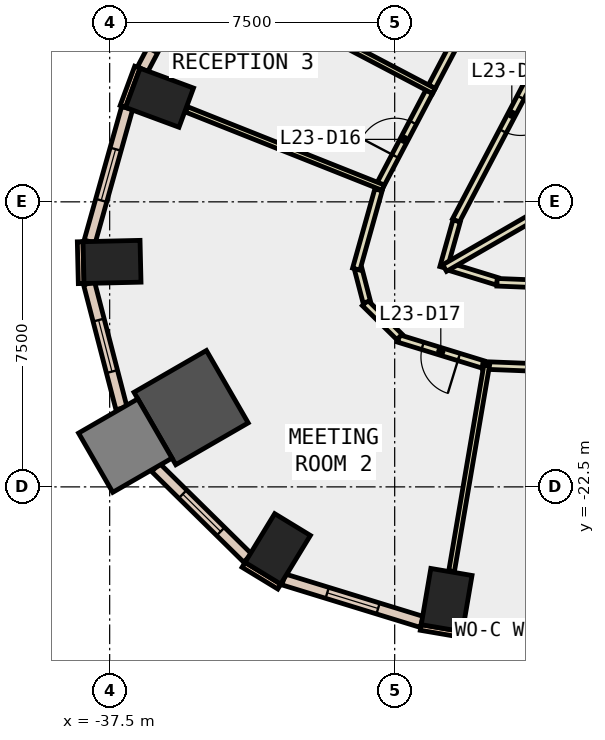
"""IFC4 building model, lengths in metres.
Left out: names, types, materials, properties, quantities, classifications, styles, units other than length and angle.
Written with IfcOpenShell. Run it as: python <this file> out.ifc"""

import sys

from ifc_helpers import new_model, si_unit, direction, frame, frame_2d, origin, origin_2d, place, context, subcontext, project, spatial, rectangle, extrude, element, fill, save


model = new_model("IFC4")
c1 = context("Model", 3, precision=1e-05, world=origin(), true_north=direction((0.0, 1.0)))
c2 = subcontext(c1, "Body", "Model", "MODEL_VIEW")
j1 = project(units=[si_unit("LENGTHUNIT", "METRE"), si_unit("PLANEANGLEUNIT", "RADIAN")], contexts=[c1])
p1 = place(None, origin())
s1 = spatial("IfcSite", under=j1, at=p1, CompositionType="ELEMENT")
p2 = place(p1, origin())
s2 = spatial("IfcBuilding", under=s1, at=p2, CompositionType="ELEMENT")
p3 = place(p2, frame((0.0, 0.0, 107.6)))
s3 = spatial("IfcBuildingStorey", under=s2, at=p3, CompositionType="ELEMENT", Elevation=107.6)
for number, where, z_axis, x_axis in (
    (1, (-28.633, -25.478, -0.4), (0.0, 0.0, 1.0), (-0.986, 0.168, 0.0)),
    (2, (-36.188, -12.261, -0.4), (0.0, 0.0, 1.0), (0.347, 0.938, 0.0)),
    (3, (-37.438, -16.581, -0.4), (0.0, 0.0, 1.0), (-0.023, 1.0, 0.0)),
):
    element("IfcColumn", number, at=place(p3, frame(where, z_axis=z_axis, x_axis=x_axis)), inside=s3, PredefinedType="COLUMN", context=c2, shape_type="SweptSolid", body=[
        extrude(rectangle(XDim=1.1, YDim=1.5, at=origin_2d()), origin(), (0.0, 0.0, 1.0), 4.2),
    ])
p4 = place(p3, frame((-35.357, -20.414, -0.4), z_axis=(0.0, 0.0, 1.0), x_axis=(0.866025403784, 0.5, 0.0)))
e4 = element("IfcColumn", 4, at=p4, inside=s3, PredefinedType="COLUMN", context=c2, shape_type="SweptSolid", body=[
    extrude(rectangle(XDim=2.2, YDim=2.2, at=origin_2d()), origin(), (0.0, 0.0, 1.0), 4.2),
])
p5 = place(p3, frame((-33.078, -24.132, -0.4), z_axis=(0.0, 0.0, 1.0), x_axis=(-0.854095929175, 0.520115510024, 0.0)))
e5 = element("IfcColumn", 5, at=p5, inside=s3, PredefinedType="COLUMN", context=c2, shape_type="SweptSolid", body=[
    extrude(rectangle(XDim=1.1, YDim=1.5, at=origin_2d()), origin(), (0.0, 0.0, 1.0), 4.2),
])
p6 = place(p3, frame((-37.089, -21.414, -0.4), z_axis=(0.0, 0.0, 1.0), x_axis=(0.866025403784, 0.5, 0.0)))
e6 = element("IfcColumn", 6, at=p6, inside=s3, PredefinedType="COLUMN", context=c2, shape_type="SweptSolid", body=[
    extrude(rectangle(XDim=1.8, YDim=1.8, at=origin_2d()), origin(), (0.0, 0.0, 1.0), 4.2),
])
p7 = place(p3, frame((-36.771, -11.458, 0.0), z_axis=(0.0, 0.0, 1.0), x_axis=(-0.347205967468, -0.937788897436, 0.0)))
e7 = element("IfcWall", 7, at=p7, inside=s3, PredefinedType="STANDARD", context=c2, shape_type="SweptSolid", body=[
    extrude(rectangle(XDim=1.1, YDim=0.15, at=frame_2d((0.55, 0.0))), origin(), (0.0, 0.0, 1.0), 3.8),
])
p8 = place(p3, frame((-29.314, -26.199, 0.0), z_axis=(0.0, 0.0, 1.0), x_axis=(0.985763338892, -0.168138751323, 0.0)))
e8 = element("IfcWall", 8, at=p8, inside=s3, PredefinedType="STANDARD", context=c2, shape_type="SweptSolid", body=[
    extrude(rectangle(XDim=1.101, YDim=0.15, at=frame_2d((0.55, 0.0))), origin(), (0.0, 0.0, 1.0), 3.8),
])
p9 = place(p3, frame((-38.276, -16.05, 0.0), z_axis=(0.0, 0.0, 1.0), x_axis=(0.023522901136, -0.999723298279, 0.0)))
e9 = element("IfcWall", 9, at=p9, inside=s3, PredefinedType="STANDARD", context=c2, shape_type="SweptSolid", body=[
    extrude(rectangle(XDim=1.1, YDim=0.15, at=frame_2d((0.55, 0.0))), origin(), (0.0, 0.0, 1.0), 3.8),
])
p10 = place(p3, frame((-33.977, -24.551, 0.0), z_axis=(0.0, 0.0, 1.0), x_axis=(0.854245682901, -0.519869515594, 0.0)))
e10 = element("IfcWall", 10, at=p10, inside=s3, PredefinedType="STANDARD", context=c2, shape_type="SweptSolid", body=[
    extrude(rectangle(XDim=1.1, YDim=0.15, at=frame_2d((0.55, 0.0))), origin(), (0.0, 0.0, 1.0), 3.8),
])
p11 = place(p3, frame((-28.205, -26.238, 0.0), z_axis=(0.0, 0.0, 1.0), x_axis=(0.99922113396, -0.039460428885, 0.0)))
e11 = element("IfcWall", 11, at=p11, inside=s3, PredefinedType="STANDARD", context=c2, shape_type="SweptSolid", body=[
    extrude(rectangle(XDim=5.878, YDim=0.3, at=frame_2d((2.939, 0.0))), origin(), (0.0, 0.0, 1.0), 3.8),
])
p12 = place(p11, frame((0.469, 0.0, 0.9)))
e12 = element("IfcOpeningElement", 12, at=p12, cuts=e11, PredefinedType="OPENING", context=c2, shape_type="SweptSolid", body=[
    extrude(rectangle(XDim=2.0, YDim=2.6, at=frame_2d((1.0, 1.3))), frame((0.0, 0.16, 0.0), z_axis=(0.0, -1.0, 0.0), x_axis=(1.0, 0.0, 0.0)), (0.0, 0.0, 1.0), 0.32),
])
p13 = place(p11, frame((3.408, 0.0, 0.9)))
e13 = element("IfcOpeningElement", 13, at=p13, cuts=e11, PredefinedType="OPENING", context=c2, shape_type="SweptSolid", body=[
    extrude(rectangle(XDim=2.0, YDim=2.6, at=frame_2d((1.0, 1.3))), frame((0.0, 0.16, 0.0), z_axis=(0.0, -1.0, 0.0), x_axis=(1.0, 0.0, 0.0)), (0.0, 0.0, 1.0), 0.32),
])
p14 = place(p3, frame((-33.776, -6.077, 0.0), z_axis=(0.0, 0.0, 1.0), x_axis=(-0.465380908665, -0.88511050714, 0.0)))
e14 = element("IfcWall", 14, at=p14, inside=s3, PredefinedType="STANDARD", context=c2, shape_type="SweptSolid", body=[
    extrude(rectangle(XDim=6.139, YDim=0.3, at=frame_2d((3.07, 0.0))), origin(), (0.0, 0.0, 1.0), 3.8),
])
p15 = place(p14, frame((0.535, 0.0, 0.9)))
e15 = element("IfcOpeningElement", 15, at=p15, cuts=e14, PredefinedType="OPENING", context=c2, shape_type="SweptSolid", body=[
    extrude(rectangle(XDim=2.0, YDim=2.6, at=frame_2d((1.0, 1.3))), frame((0.0, 0.16, 0.0), z_axis=(0.0, -1.0, 0.0), x_axis=(1.0, 0.0, 0.0)), (0.0, 0.0, 1.0), 0.32),
])
p16 = place(p14, frame((3.604, 0.0, 0.9)))
e16 = element("IfcOpeningElement", 16, at=p16, cuts=e14, PredefinedType="OPENING", context=c2, shape_type="SweptSolid", body=[
    extrude(rectangle(XDim=2.0, YDim=2.6, at=frame_2d((1.0, 1.3))), frame((0.0, 0.16, 0.0), z_axis=(0.0, -1.0, 0.0), x_axis=(1.0, 0.0, 0.0)), (0.0, 0.0, 1.0), 0.32),
])
p17 = place(p3, frame((-37.04, -12.531, 0.0), z_axis=(0.0, 0.0, 1.0), x_axis=(-0.270054089595, -0.96284515302, 0.0)))
e17 = element("IfcWall", 17, at=p17, inside=s3, PredefinedType="STANDARD", context=c2, shape_type="SweptSolid", body=[
    extrude(rectangle(XDim=3.651, YDim=0.3, at=frame_2d((1.825, 0.0))), origin(), (0.0, 0.0, 1.0), 3.8),
])
p18 = place(p17, frame((1.125, 0.0, 0.9)))
e18 = element("IfcOpeningElement", 18, at=p18, cuts=e17, PredefinedType="OPENING", context=c2, shape_type="SweptSolid", body=[
    extrude(rectangle(XDim=1.4, YDim=2.6, at=frame_2d((0.7, 1.3))), frame((0.0, 0.16, 0.0), z_axis=(0.0, -1.0, 0.0), x_axis=(1.0, 0.0, 0.0)), (0.0, 0.0, 1.0), 0.32),
])
p19 = place(p3, frame((-38.042, -17.144, 0.0), z_axis=(0.0, 0.0, 1.0), x_axis=(0.251046938153, -0.967974914367, 0.0)))
e19 = element("IfcWall", 19, at=p19, inside=s3, PredefinedType="STANDARD", context=c2, shape_type="SweptSolid", body=[
    extrude(rectangle(XDim=3.398, YDim=0.3, at=frame_2d((1.699, 0.0))), origin(), (0.0, 0.0, 1.0), 3.8),
])
p20 = place(p19, frame((0.999, 0.0, 0.9)))
e20 = element("IfcOpeningElement", 20, at=p20, cuts=e19, PredefinedType="OPENING", context=c2, shape_type="SweptSolid", body=[
    extrude(rectangle(XDim=1.4, YDim=2.6, at=frame_2d((0.7, 1.3))), frame((0.0, 0.16, 0.0), z_axis=(0.0, -1.0, 0.0), x_axis=(1.0, 0.0, 0.0)), (0.0, 0.0, 1.0), 0.32),
])
p21 = place(p3, frame((-36.289, -21.99, 0.0), z_axis=(0.0, 0.0, 1.0), x_axis=(0.712546371703, -0.701625019631, 0.0)))
e21 = element("IfcWall", 21, at=p21, inside=s3, PredefinedType="STANDARD", context=c2, shape_type="SweptSolid", body=[
    extrude(rectangle(XDim=3.398, YDim=0.3, at=frame_2d((1.699, 0.0))), origin(), (0.0, 0.0, 1.0), 3.8),
])
p22 = place(p21, frame((0.999, 0.0, 0.9)))
e22 = element("IfcOpeningElement", 22, at=p22, cuts=e21, PredefinedType="OPENING", context=c2, shape_type="SweptSolid", body=[
    extrude(rectangle(XDim=1.4, YDim=2.6, at=frame_2d((0.7, 1.3))), frame((0.0, 0.16, 0.0), z_axis=(0.0, -1.0, 0.0), x_axis=(1.0, 0.0, 0.0)), (0.0, 0.0, 1.0), 0.32),
])
p23 = place(p3, frame((-32.924, -24.935, 0.0), z_axis=(0.0, 0.0, 1.0), x_axis=(0.955841433148, -0.293882892794, 0.0)))
e23 = element("IfcWall", 23, at=p23, inside=s3, PredefinedType="STANDARD", context=c2, shape_type="SweptSolid", body=[
    extrude(rectangle(XDim=3.804, YDim=0.3, at=frame_2d((1.902, 0.0))), origin(), (0.0, 0.0, 1.0), 3.8),
])
p24 = place(p23, frame((1.202, 0.0, 0.9)))
e24 = element("IfcOpeningElement", 24, at=p24, cuts=e23, PredefinedType="OPENING", context=c2, shape_type="SweptSolid", body=[
    extrude(rectangle(XDim=1.4, YDim=2.6, at=frame_2d((0.7, 1.3))), frame((0.0, 0.16, 0.0), z_axis=(0.0, -1.0, 0.0), x_axis=(1.0, 0.0, 0.0)), (0.0, 0.0, 1.0), 0.32),
])
p25 = place(p3, frame((-25.446, -9.896, 0.0), z_axis=(0.0, 0.0, 1.0), x_axis=(-0.465367816287, -0.885117390838, 0.0)))
e25 = element("IfcWall", 25, at=p25, inside=s3, PredefinedType="PARTITIONING", context=c2, shape_type="SweptSolid", body=[
    extrude(rectangle(XDim=6.326, YDim=0.2, at=frame_2d((3.163, 0.0))), origin(), (0.0, 0.0, 1.0), 3.8),
])
p26 = place(p25, frame((2.663, 0.0, 0.0)))
e26 = element("IfcOpeningElement", 26, at=p26, cuts=e25, PredefinedType="OPENING", context=c2, shape_type="SweptSolid", body=[
    extrude(rectangle(XDim=1.0, YDim=2.1, at=frame_2d((0.5, 1.05))), frame((0.0, 0.11, 0.0), z_axis=(0.0, -1.0, 0.0), x_axis=(1.0, 0.0, 0.0)), (0.0, 0.0, 1.0), 0.22),
])
p27 = place(p3, frame((-28.37, -15.503, 0.0), z_axis=(0.0, 0.0, 1.0), x_axis=(-0.270645732093, -0.962679015924, 0.0)))
e27 = element("IfcWall", 27, at=p27, inside=s3, PredefinedType="PARTITIONING", context=c2, shape_type="SweptSolid", body=[
    extrude(rectangle(XDim=1.275, YDim=0.2, at=frame_2d((0.637, 0.0))), origin(), (0.0, 0.0, 1.0), 3.8),
])
p28 = place(p3, frame((-28.503, -16.722, 0.0), z_axis=(0.0, 0.0, 1.0), x_axis=(0.95579582576, -0.294031187904, 0.0)))
e28 = element("IfcWall", 28, at=p28, inside=s3, PredefinedType="PARTITIONING", context=c2, shape_type="SweptSolid", body=[
    extrude(rectangle(XDim=1.255, YDim=0.2, at=frame_2d((0.628, 0.0))), origin(), (0.0, 0.0, 1.0), 3.8),
])
p29 = place(p3, frame((-27.307, -17.116, 0.0), z_axis=(0.0, 0.0, 1.0), x_axis=(0.999217829656, -0.039544012168, 0.0)))
e29 = element("IfcWall", 29, at=p29, inside=s3, PredefinedType="PARTITIONING", context=c2, shape_type="SweptSolid", body=[
    extrude(rectangle(XDim=5.841, YDim=0.2, at=frame_2d((2.92, 0.0))), origin(), (0.0, 0.0, 1.0), 3.8),
])
p30 = place(p29, frame((2.42, 0.0, 0.0)))
e30 = element("IfcOpeningElement", 30, at=p30, cuts=e29, PredefinedType="OPENING", context=c2, shape_type="SweptSolid", body=[
    extrude(rectangle(XDim=1.0, YDim=2.1, at=frame_2d((0.5, 1.05))), frame((0.0, 0.11, 0.0), z_axis=(0.0, -1.0, 0.0), x_axis=(1.0, 0.0, 0.0)), (0.0, 0.0, 1.0), 0.22),
])
p31 = place(p3, frame((-29.023, -11.972, 0.0), z_axis=(0.0, 0.0, 1.0), x_axis=(0.465457263931, 0.885070356217, 0.0)))
e31 = element("IfcWall", 31, at=p31, inside=s3, PredefinedType="PARTITIONING", context=c2, shape_type="SweptSolid", body=[
    extrude(rectangle(XDim=3.515, YDim=0.2, at=frame_2d((1.757, 0.0))), origin(), (0.0, 0.0, 1.0), 3.8),
])
p32 = place(p31, frame((1.257, 0.0, 0.0)))
e32 = element("IfcOpeningElement", 32, at=p32, cuts=e31, PredefinedType="OPENING", context=c2, shape_type="SweptSolid", body=[
    extrude(rectangle(XDim=1.0, YDim=2.1, at=frame_2d((0.5, 1.05))), frame((0.0, 0.11, 0.0), z_axis=(0.0, -1.0, 0.0), x_axis=(1.0, 0.0, 0.0)), (0.0, 0.0, 1.0), 0.22),
])
p33 = place(p3, frame((-30.41, -14.61, 0.0), z_axis=(0.0, 0.0, 1.0), x_axis=(0.46516343569, 0.885224817827, 0.0)))
e33 = element("IfcWall", 33, at=p33, inside=s3, PredefinedType="PARTITIONING", context=c2, shape_type="SweptSolid", body=[
    extrude(rectangle(XDim=2.831, YDim=0.2, at=frame_2d((1.416, 0.0))), origin(), (0.0, 0.0, 1.0), 3.8),
])
p34 = place(p33, frame((0.916, 0.0, 0.0)))
e34 = element("IfcOpeningElement", 34, at=p34, cuts=e33, PredefinedType="OPENING", context=c2, shape_type="SweptSolid", body=[
    extrude(rectangle(XDim=1.0, YDim=2.1, at=frame_2d((0.5, 1.05))), frame((0.0, 0.11, 0.0), z_axis=(0.0, -1.0, 0.0), x_axis=(1.0, 0.0, 0.0)), (0.0, 0.0, 1.0), 0.22),
])
p35 = place(p3, frame((-27.676, -19.278, 0.0), z_axis=(0.0, 0.0, 1.0), x_axis=(-0.95581080774, 0.293982482143, 0.0)))
e35 = element("IfcWall", 35, at=p35, inside=s3, PredefinedType="PARTITIONING", context=c2, shape_type="SweptSolid", body=[
    extrude(rectangle(XDim=2.324, YDim=0.2, at=frame_2d((1.162, 0.0))), origin(), (0.0, 0.0, 1.0), 3.8),
])
p36 = place(p35, frame((0.662, 0.0, 0.0)))
e36 = element("IfcOpeningElement", 36, at=p36, cuts=e35, PredefinedType="OPENING", context=c2, shape_type="SweptSolid", body=[
    extrude(rectangle(XDim=1.0, YDim=2.1, at=frame_2d((0.5, 1.05))), frame((0.0, 0.11, 0.0), z_axis=(0.0, -1.0, 0.0), x_axis=(1.0, 0.0, 0.0)), (0.0, 0.0, 1.0), 0.22),
])
p37 = place(p3, frame((-29.873, -18.554, 0.0), z_axis=(0.0, 0.0, 1.0), x_axis=(-0.712546188185, 0.701625206006, 0.0)))
e37 = element("IfcWall", 37, at=p37, inside=s3, PredefinedType="PARTITIONING", context=c2, shape_type="SweptSolid", body=[
    extrude(rectangle(XDim=1.274, YDim=0.2, at=frame_2d((0.637, 0.0))), origin(), (0.0, 0.0, 1.0), 3.8),
])
p38 = place(p3, frame((-30.735, -17.634, 0.0), z_axis=(0.0, 0.0, 1.0), x_axis=(-0.251095196118, 0.967962397248, 0.0)))
e38 = element("IfcWall", 38, at=p38, inside=s3, PredefinedType="PARTITIONING", context=c2, shape_type="SweptSolid", body=[
    extrude(rectangle(XDim=0.892, YDim=0.2, at=frame_2d((0.446, 0.0))), origin(), (0.0, 0.0, 1.0), 3.8),
])
p39 = place(p3, frame((-31.011, -16.77, 0.0), z_axis=(0.0, 0.0, 1.0), x_axis=(0.270131711391, 0.962823378664, 0.0)))
e39 = element("IfcWall", 39, at=p39, inside=s3, PredefinedType="PARTITIONING", context=c2, shape_type="SweptSolid", body=[
    extrude(rectangle(XDim=2.166, YDim=0.2, at=frame_2d((1.083, 0.0))), origin(), (0.0, 0.0, 1.0), 3.8),
])
p40 = place(p3, frame((-21.547, -19.546, 0.0), z_axis=(0.0, 0.0, 1.0), x_axis=(-0.999216450883, 0.039578836331, 0.0)))
e40 = element("IfcWall", 40, at=p40, inside=s3, PredefinedType="PARTITIONING", context=c2, shape_type="SweptSolid", body=[
    extrude(rectangle(XDim=6.138, YDim=0.2, at=frame_2d((3.069, 0.0))), origin(), (0.0, 0.0, 1.0), 3.8),
])
p41 = place(p40, frame((2.569, 0.0, 0.0)))
e41 = element("IfcOpeningElement", 41, at=p41, cuts=e40, PredefinedType="OPENING", context=c2, shape_type="SweptSolid", body=[
    extrude(rectangle(XDim=1.0, YDim=2.1, at=frame_2d((0.5, 1.05))), frame((0.0, 0.11, 0.0), z_axis=(0.0, -1.0, 0.0), x_axis=(1.0, 0.0, 0.0)), (0.0, 0.0, 1.0), 0.22),
])
p42 = place(p3, frame((-19.277, -11.311, 0.0), z_axis=(0.0, 0.0, 1.0), x_axis=(-0.866078939042, -0.499907262747, 0.0)))
e42 = element("IfcWall", 42, at=p42, inside=s3, PredefinedType="PARTITIONING", context=c2, shape_type="SweptSolid", body=[
    extrude(rectangle(XDim=10.864, YDim=0.2, at=frame_2d((5.432, 0.0))), origin(), (0.0, 0.0, 1.0), 3.8),
])
p43 = place(p3, frame((-28.969, -12.084, 0.0), z_axis=(0.0, 0.0, 1.0), x_axis=(-0.885142220222, 0.465320588391, 0.0)))
e43 = element("IfcWall", 43, at=p43, inside=s3, PredefinedType="PARTITIONING", context=c2, shape_type="SweptSolid", body=[
    extrude(rectangle(XDim=6.9, YDim=0.15, at=frame_2d((3.45, 0.0))), origin(), (0.0, 0.0, 1.0), 3.8),
])
p44 = place(p3, frame((-30.306, -14.625, 0.0), z_axis=(0.0, 0.0, 1.0), x_axis=(-0.929128339298, 0.369757392235, 0.0)))
e44 = element("IfcWall", 44, at=p44, inside=s3, PredefinedType="PARTITIONING", context=c2, shape_type="SweptSolid", body=[
    extrude(rectangle(XDim=5.569, YDim=0.15, at=frame_2d((2.784, 0.0))), origin(), (0.0, 0.0, 1.0), 3.8),
])
p45 = place(p3, frame((-27.58, -19.307, 0.0), z_axis=(0.0, 0.0, 1.0), x_axis=(-0.168089900424, -0.98577167, 0.0)))
e45 = element("IfcWall", 45, at=p45, inside=s3, PredefinedType="PARTITIONING", context=c2, shape_type="SweptSolid", body=[
    extrude(rectangle(XDim=5.49, YDim=0.15, at=frame_2d((2.745, 0.0))), origin(), (0.0, 0.0, 1.0), 3.8),
])
p46 = place(p12, origin())
e46 = element("IfcWindow", 46, at=p46, inside=s3, PartitioningType="SINGLE_PANEL", PredefinedType="WINDOW", context=c2, shape_type="SweptSolid", body=[
    extrude(rectangle(XDim=2.0, YDim=2.6, at=frame_2d((1.0, 1.3))), frame((0.0, 0.03, 0.0), z_axis=(0.0, -1.0, 0.0), x_axis=(1.0, 0.0, 0.0)), (0.0, 0.0, 1.0), 0.06),
])
fill(e12, e46)
p47 = place(p18, origin())
e47 = element("IfcWindow", 47, at=p47, inside=s3, PartitioningType="SINGLE_PANEL", PredefinedType="WINDOW", context=c2, shape_type="SweptSolid", body=[
    extrude(rectangle(XDim=1.4, YDim=2.6, at=frame_2d((0.7, 1.3))), frame((0.0, 0.03, 0.0), z_axis=(0.0, -1.0, 0.0), x_axis=(1.0, 0.0, 0.0)), (0.0, 0.0, 1.0), 0.06),
])
fill(e18, e47)
p48 = place(p20, origin())
e48 = element("IfcWindow", 48, at=p48, inside=s3, PartitioningType="SINGLE_PANEL", PredefinedType="WINDOW", context=c2, shape_type="SweptSolid", body=[
    extrude(rectangle(XDim=1.4, YDim=2.6, at=frame_2d((0.7, 1.3))), frame((0.0, 0.03, 0.0), z_axis=(0.0, -1.0, 0.0), x_axis=(1.0, 0.0, 0.0)), (0.0, 0.0, 1.0), 0.06),
])
fill(e20, e48)
p49 = place(p22, origin())
e49 = element("IfcWindow", 49, at=p49, inside=s3, PartitioningType="SINGLE_PANEL", PredefinedType="WINDOW", context=c2, shape_type="SweptSolid", body=[
    extrude(rectangle(XDim=1.4, YDim=2.6, at=frame_2d((0.7, 1.3))), frame((0.0, 0.03, 0.0), z_axis=(0.0, -1.0, 0.0), x_axis=(1.0, 0.0, 0.0)), (0.0, 0.0, 1.0), 0.06),
])
fill(e22, e49)
p50 = place(p24, origin())
e50 = element("IfcWindow", 50, at=p50, inside=s3, PartitioningType="SINGLE_PANEL", PredefinedType="WINDOW", context=c2, shape_type="SweptSolid", body=[
    extrude(rectangle(XDim=1.4, YDim=2.6, at=frame_2d((0.7, 1.3))), frame((0.0, 0.03, 0.0), z_axis=(0.0, -1.0, 0.0), x_axis=(1.0, 0.0, 0.0)), (0.0, 0.0, 1.0), 0.06),
])
fill(e24, e50)
p51 = place(p34, origin())
e51 = element("IfcDoor", 51, at=p51, inside=s3, OperationType="SINGLE_SWING_LEFT", PredefinedType="DOOR", context=c2, shape_type="SweptSolid", body=[
    extrude(rectangle(XDim=1.0, YDim=2.1, at=frame_2d((0.5, 1.05))), frame((0.0, 0.025, 0.0), z_axis=(0.0, -1.0, 0.0), x_axis=(1.0, 0.0, 0.0)), (0.0, 0.0, 1.0), 0.05),
])
fill(e34, e51)
p52 = place(p36, origin())
e52 = element("IfcDoor", 52, at=p52, inside=s3, OperationType="SINGLE_SWING_LEFT", PredefinedType="DOOR", context=c2, shape_type="SweptSolid", body=[
    extrude(rectangle(XDim=1.0, YDim=2.1, at=frame_2d((0.5, 1.05))), frame((0.0, 0.025, 0.0), z_axis=(0.0, -1.0, 0.0), x_axis=(1.0, 0.0, 0.0)), (0.0, 0.0, 1.0), 0.05),
])
fill(e36, e52)
p53 = place(p26, origin())
e53 = element("IfcDoor", 53, at=p53, inside=s3, OperationType="SINGLE_SWING_LEFT", PredefinedType="DOOR", context=c2, shape_type="SweptSolid", body=[
    extrude(rectangle(XDim=1.0, YDim=2.1, at=frame_2d((0.5, 1.05))), frame((0.0, 0.025, 0.0), z_axis=(0.0, -1.0, 0.0), x_axis=(1.0, 0.0, 0.0)), (0.0, 0.0, 1.0), 0.05),
])
fill(e26, e53)
save(model, sys.argv[1])
